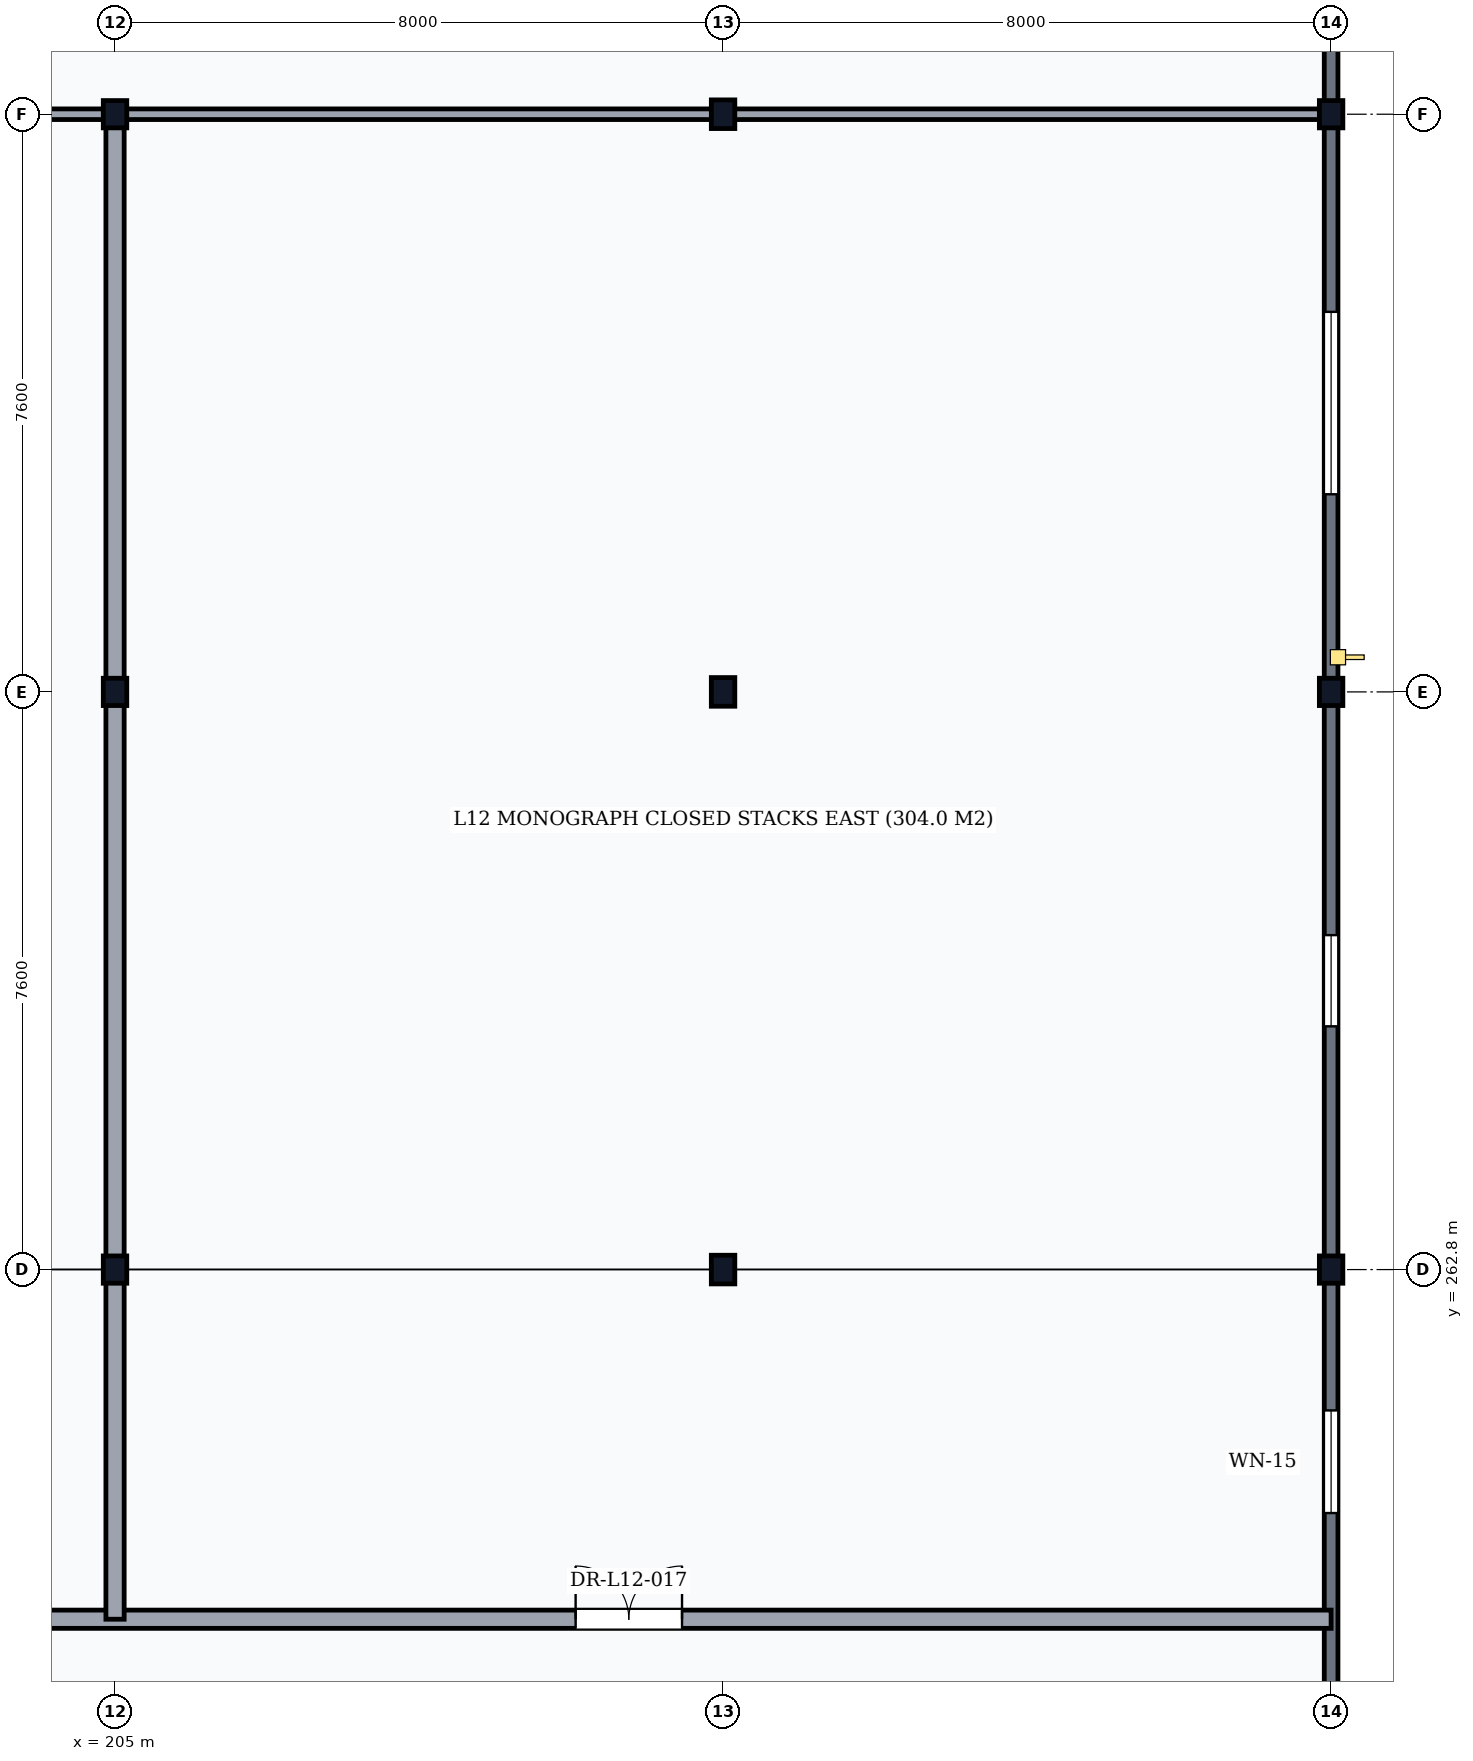
"""IFC4 building model, lengths in metres.
Left out: names, types, materials, properties, quantities, classifications, styles, units other than length and angle.
Written with IfcOpenShell. Run it as: python <this file> out.ifc"""

import sys

from ifc_helpers import new_model, si_unit, direction, frame, frame_2d, origin, origin_2d, place, context, subcontext, project, spatial, rectangle, i_section, extrude, element, fill, save


model = new_model("IFC4")
c1 = context("Model", 3, precision=1e-05, world=origin(), true_north=direction((0.0, 1.0)))
c2 = subcontext(c1, "Body", "Model", "MODEL_VIEW")
j1 = project(units=[si_unit("LENGTHUNIT", "METRE"), si_unit("PLANEANGLEUNIT", "RADIAN")], contexts=[c1])
p1 = place(None, origin())
s1 = spatial("IfcSite", under=j1, at=p1, CompositionType="ELEMENT")
p2 = place(p1, origin())
s2 = spatial("IfcBuilding", under=s1, at=p2, CompositionType="ELEMENT")
p3 = place(p2, frame((0.0, 0.0, 47.7)))
s3 = spatial("IfcBuildingStorey", under=s2, at=p3, CompositionType="ELEMENT", Elevation=47.7)
for number, where, z_axis, x_axis in (
    (1, (205.0, 262.8, 0.0), (0.0, 0.0, 1.0), (1.0, 0.0, 0.0)),
    (2, (205.0, 270.4, 0.0), (0.0, 0.0, 1.0), (1.0, 0.0, 0.0)),
    (3, (205.0, 278.0, 0.0), (0.0, 0.0, 1.0), (1.0, 0.0, 0.0)),
):
    element("IfcColumn", number, at=place(p3, frame(where, z_axis=z_axis, x_axis=x_axis)), inside=s3, PredefinedType="COLUMN", context=c2, shape_type="SweptSolid", body=[
        extrude(i_section(OverallWidth=0.309, OverallDepth=0.359, WebThickness=0.021, FlangeThickness=0.04, FilletRadius=0.027, at=origin_2d()), origin(), (0.0, 0.0, 1.0), 3.9),
    ])
for number, where, z_axis, x_axis in (
    (4, (213.0, 262.8, 0.0), (0.0, 0.0, 1.0), (1.0, 0.0, 0.0)),
    (5, (213.0, 270.4, 0.0), (0.0, 0.0, 1.0), (1.0, 0.0, 0.0)),
    (6, (213.0, 278.0, 0.0), (0.0, 0.0, 1.0), (1.0, 0.0, 0.0)),
):
    element("IfcColumn", number, at=place(p3, frame(where, z_axis=z_axis, x_axis=x_axis)), inside=s3, PredefinedType="COLUMN", context=c2, shape_type="SweptSolid", body=[
        extrude(i_section(OverallWidth=0.309, OverallDepth=0.377, WebThickness=0.021, FlangeThickness=0.04, FilletRadius=0.027, at=origin_2d()), origin(), (0.0, 0.0, 1.0), 3.9),
    ])
for number, where, z_axis, x_axis in (
    (7, (221.0, 262.8, 0.0), (0.0, 0.0, 1.0), (1.0, 0.0, 0.0)),
    (8, (221.0, 270.4, 0.0), (0.0, 0.0, 1.0), (1.0, 0.0, 0.0)),
    (9, (221.0, 278.0, 0.0), (0.0, 0.0, 1.0), (1.0, 0.0, 0.0)),
):
    element("IfcColumn", number, at=place(p3, frame(where, z_axis=z_axis, x_axis=x_axis)), inside=s3, PredefinedType="COLUMN", context=c2, shape_type="SweptSolid", body=[
        extrude(i_section(OverallWidth=0.309, OverallDepth=0.359, WebThickness=0.021, FlangeThickness=0.04, FilletRadius=0.027, at=origin_2d()), origin(), (0.0, 0.0, 1.0), 3.9),
    ])
p4 = place(p3, frame((221.0, 255.206, 0.0), z_axis=(0.0, 0.0, 1.0), x_axis=(0.0, 1.0, 0.0)))
e10 = element("IfcWall", 10, at=p4, inside=s3, PredefinedType="SOLIDWALL", context=c2, shape_type="SweptSolid", body=[
    extrude(rectangle(XDim=7.588, YDim=0.18, at=frame_2d((3.794, 0.0))), origin(), (0.0, 0.0, 1.0), 3.338),
])
p5 = place(p4, frame((4.391, 0.0, 0.95)))
e11 = element("IfcOpeningElement", 11, at=p5, cuts=e10, PredefinedType="OPENING", context=c2, shape_type="SweptSolid", body=[
    extrude(rectangle(XDim=1.35, YDim=1.8, at=frame_2d((0.675, 0.9))), frame((0.0, 0.105, 0.0), z_axis=(0.0, -1.0, 0.0), x_axis=(1.0, 0.0, 0.0)), (0.0, 0.0, 1.0), 0.21),
])
p6 = place(p3, frame((221.0, 262.806, 0.0), z_axis=(0.0, 0.0, 1.0), x_axis=(0.0, 1.0, 0.0)))
e12 = element("IfcWall", 12, at=p6, inside=s3, PredefinedType="SOLIDWALL", context=c2, shape_type="SweptSolid", body=[
    extrude(rectangle(XDim=7.588, YDim=0.18, at=frame_2d((3.794, 0.0))), origin(), (0.0, 0.0, 1.0), 3.338),
])
p7 = place(p6, frame((3.194, 0.0, 0.95)))
e13 = element("IfcOpeningElement", 13, at=p7, cuts=e12, PredefinedType="OPENING", context=c2, shape_type="SweptSolid", body=[
    extrude(rectangle(XDim=1.2, YDim=1.8, at=frame_2d((0.6, 0.9))), frame((0.0, 0.105, 0.0), z_axis=(0.0, -1.0, 0.0), x_axis=(1.0, 0.0, 0.0)), (0.0, 0.0, 1.0), 0.21),
])
p8 = place(p3, frame((221.0, 270.406, 0.0), z_axis=(0.0, 0.0, 1.0), x_axis=(0.0, 1.0, 0.0)))
e14 = element("IfcWall", 14, at=p8, inside=s3, PredefinedType="SOLIDWALL", context=c2, shape_type="SweptSolid", body=[
    extrude(rectangle(XDim=7.588, YDim=0.18, at=frame_2d((3.794, 0.0))), origin(), (0.0, 0.0, 1.0), 3.338),
])
p9 = place(p8, frame((2.594, 0.0, 0.95)))
e15 = element("IfcOpeningElement", 15, at=p9, cuts=e14, PredefinedType="OPENING", context=c2, shape_type="SweptSolid", body=[
    extrude(rectangle(XDim=2.4, YDim=2.2, at=frame_2d((1.2, 1.1))), frame((0.0, 0.105, 0.0), z_axis=(0.0, -1.0, 0.0), x_axis=(1.0, 0.0, 0.0)), (0.0, 0.0, 1.0), 0.21),
])
p10 = place(p3, frame((221.0, 278.006, 0.0), z_axis=(0.0, 0.0, 1.0), x_axis=(0.0, 1.0, 0.0)))
e16 = element("IfcWall", 16, at=p10, inside=s3, PredefinedType="SOLIDWALL", context=c2, shape_type="SweptSolid", body=[
    extrude(rectangle(XDim=7.588, YDim=0.18, at=frame_2d((3.794, 0.0))), origin(), (0.0, 0.0, 1.0), 3.338),
])
p11 = place(p10, frame((2.694, 0.0, 0.95)))
e17 = element("IfcOpeningElement", 17, at=p11, cuts=e16, PredefinedType="OPENING", context=c2, shape_type="SweptSolid", body=[
    extrude(rectangle(XDim=2.2, YDim=2.1, at=frame_2d((1.1, 1.05))), frame((0.0, 0.105, 0.0), z_axis=(0.0, -1.0, 0.0), x_axis=(1.0, 0.0, 0.0)), (0.0, 0.0, 1.0), 0.21),
])
p12 = place(p3, frame((184.0, 258.2, 0.0), z_axis=(0.0, 0.0, 1.0), x_axis=(1.0, 0.0, 0.0)))
e18 = element("IfcWall", 18, at=p12, inside=s3, PredefinedType="PARTITIONING", context=c2, shape_type="SweptSolid", body=[
    extrude(rectangle(XDim=37.0, YDim=0.24, at=frame_2d((18.5, 0.0))), origin(), (0.0, 0.0, 1.0), 3.61),
])
p13 = place(p12, frame((9.3, 0.0, 0.0)))
e19 = element("IfcOpeningElement", 19, at=p13, cuts=e18, PredefinedType="OPENING", context=c2, shape_type="SweptSolid", body=[
    extrude(rectangle(XDim=1.4, YDim=2.1, at=frame_2d((0.7, 1.05))), frame((0.0, 0.135, 0.0), z_axis=(0.0, -1.0, 0.0), x_axis=(1.0, 0.0, 0.0)), (0.0, 0.0, 1.0), 0.27),
])
p14 = place(p12, frame((27.06, 0.0, 0.0)))
e20 = element("IfcOpeningElement", 20, at=p14, cuts=e18, PredefinedType="OPENING", context=c2, shape_type="SweptSolid", body=[
    extrude(rectangle(XDim=1.4, YDim=2.1, at=frame_2d((0.7, 1.05))), frame((0.0, 0.135, 0.0), z_axis=(0.0, -1.0, 0.0), x_axis=(1.0, 0.0, 0.0)), (0.0, 0.0, 1.0), 0.27),
])
p15 = place(p3, frame((205.0, 258.2, 0.0), z_axis=(0.0, 0.0, 1.0), x_axis=(0.0, 1.0, 0.0)))
e21 = element("IfcWall", 21, at=p15, inside=s3, PredefinedType="PARTITIONING", context=c2, shape_type="SweptSolid", body=[
    extrude(rectangle(XDim=19.8, YDim=0.24, at=frame_2d((9.9, 0.0))), origin(), (0.0, 0.0, 1.0), 3.208),
])
p16 = place(p3, frame((165.0, 278.0, 0.0), z_axis=(0.0, 0.0, 1.0), x_axis=(1.0, 0.0, 0.0)))
e22 = element("IfcWall", 22, at=p16, inside=s3, PredefinedType="PARTITIONING", context=c2, shape_type="SweptSolid", body=[
    extrude(rectangle(XDim=56.0, YDim=0.14, at=frame_2d((28.0, 0.0))), origin(), (0.0, 0.0, 1.0), 3.108),
])
p17 = place(p16, frame((16.7, 0.0, 0.0)))
e23 = element("IfcOpeningElement", 23, at=p17, cuts=e22, PredefinedType="OPENING", context=c2, shape_type="SweptSolid", body=[
    extrude(rectangle(XDim=1.6, YDim=2.25, at=frame_2d((0.8, 1.125))), frame((0.0, 0.085, 0.0), z_axis=(0.0, -1.0, 0.0), x_axis=(1.0, 0.0, 0.0)), (0.0, 0.0, 1.0), 0.17),
])
p18 = place(p5, origin())
e24 = element("IfcWindow", 24, at=p18, inside=s3, PartitioningType="SINGLE_PANEL", PredefinedType="WINDOW", context=c2, shape_type="SweptSolid", body=[
    extrude(rectangle(XDim=1.35, YDim=1.8, at=frame_2d((0.675, 0.9))), frame((0.0, 0.03, 0.0), z_axis=(0.0, -1.0, 0.0), x_axis=(1.0, 0.0, 0.0)), (0.0, 0.0, 1.0), 0.06),
])
fill(e11, e24)
p19 = place(p7, origin())
e25 = element("IfcWindow", 25, at=p19, inside=s3, PartitioningType="SINGLE_PANEL", PredefinedType="WINDOW", context=c2, shape_type="SweptSolid", body=[
    extrude(rectangle(XDim=1.2, YDim=1.8, at=frame_2d((0.6, 0.9))), frame((0.0, 0.03, 0.0), z_axis=(0.0, -1.0, 0.0), x_axis=(1.0, 0.0, 0.0)), (0.0, 0.0, 1.0), 0.06),
])
fill(e13, e25)
p20 = place(p9, origin())
e26 = element("IfcWindow", 26, at=p20, inside=s3, PartitioningType="DOUBLE_PANEL_VERTICAL", PredefinedType="WINDOW", context=c2, shape_type="SweptSolid", body=[
    extrude(rectangle(XDim=2.4, YDim=2.2, at=frame_2d((1.2, 1.1))), frame((0.0, 0.03, 0.0), z_axis=(0.0, -1.0, 0.0), x_axis=(1.0, 0.0, 0.0)), (0.0, 0.0, 1.0), 0.06),
])
fill(e15, e26)
p21 = place(p14, origin())
e27 = element("IfcDoor", 27, at=p21, inside=s3, OperationType="DOUBLE_DOOR_SINGLE_SWING", PredefinedType="DOOR", context=c2, shape_type="SweptSolid", body=[
    extrude(rectangle(XDim=1.4, YDim=2.1, at=frame_2d((0.7, 1.05))), frame((0.0, 0.025, 0.0), z_axis=(0.0, -1.0, 0.0), x_axis=(1.0, 0.0, 0.0)), (0.0, 0.0, 1.0), 0.05),
])
fill(e20, e27)
save(model, sys.argv[1])
